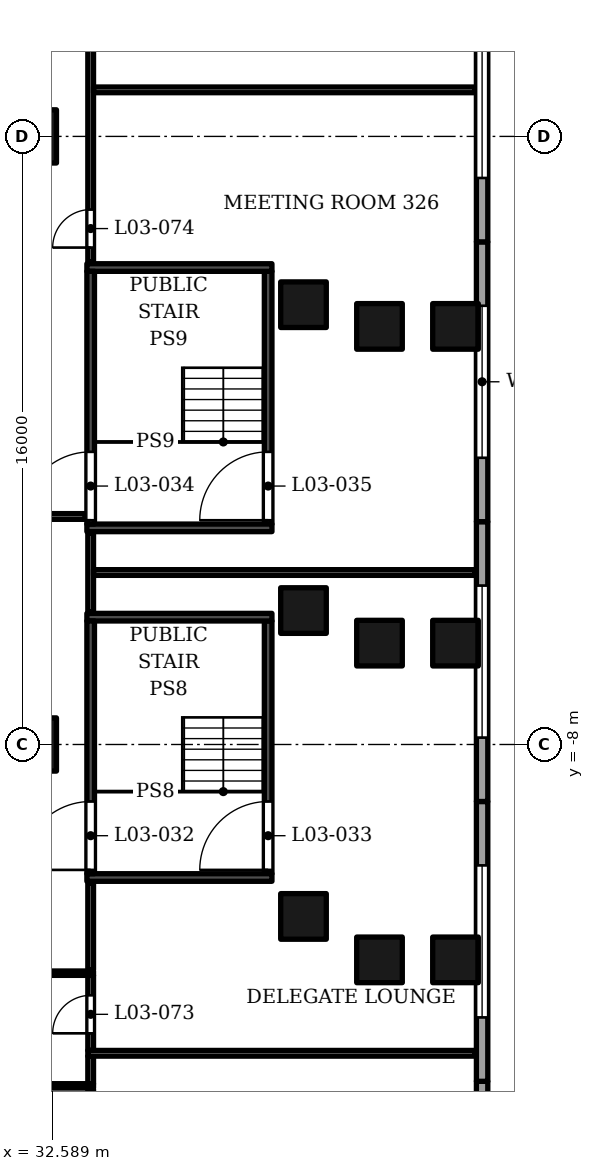
"""IFC4 building model, lengths in metres.
Left out: names, types, materials, properties, quantities, classifications, styles, units other than length and angle.
Written with IfcOpenShell. Run it as: python <this file> out.ifc"""

import sys

from ifc_helpers import new_model, si_unit, direction, frame, frame_2d, origin, origin_2d, place, context, subcontext, project, spatial, rectangle, extrude, element, fill, save


model = new_model("IFC4")
c1 = context("Model", 3, precision=1e-05, world=origin(), true_north=direction((0.0, 1.0)))
c2 = subcontext(c1, "Body", "Model", "MODEL_VIEW")
j1 = project(units=[si_unit("LENGTHUNIT", "METRE"), si_unit("PLANEANGLEUNIT", "RADIAN")], contexts=[c1])
p1 = place(None, origin())
s1 = spatial("IfcSite", under=j1, at=p1, CompositionType="ELEMENT")
p2 = place(p1, origin())
s2 = spatial("IfcBuilding", under=s1, at=p2, CompositionType="ELEMENT")
p3 = place(p2, frame((0.0, 0.0, 29.0)))
s3 = spatial("IfcBuildingStorey", under=s2, at=p3, CompositionType="ELEMENT", Elevation=29.0)
for number, where, z_axis, x_axis in (
    (1, (32.0, -8.0, 0.0), (0.0, 0.0, 1.0), (1.0, 0.0, 0.0)),
    (2, (32.0, 8.0, 0.0), (0.0, 0.0, 1.0), (1.0, 0.0, 0.0)),
):
    element("IfcColumn", number, at=place(p3, frame(where, z_axis=z_axis, x_axis=x_axis)), inside=s3, PredefinedType="COLUMN", context=c2, shape_type="SweptSolid", body=[
        extrude(rectangle(XDim=1.4, YDim=1.4, at=origin_2d()), origin(), (0.0, 0.0, 1.0), 5.5),
    ])
for number, where, z_axis, x_axis in (
    (3, (39.2, 3.572, 0.0), (0.0, 0.0, 1.0), (1.0, 0.0, 0.0)),
    (4, (39.2, -4.476, 0.0), (0.0, 0.0, 1.0), (1.0, 0.0, 0.0)),
    (5, (39.2, -12.524, 0.0), (0.0, 0.0, 1.0), (1.0, 0.0, 0.0)),
    (6, (41.2, 3.001, 0.0), (0.0, 0.0, 1.0), (1.0, 0.0, 0.0)),
    (7, (41.2, -5.333, 0.0), (0.0, 0.0, 1.0), (1.0, 0.0, 0.0)),
    (8, (41.2, -13.667, 0.0), (0.0, 0.0, 1.0), (1.0, 0.0, 0.0)),
    (9, (43.2, 3.001, 0.0), (0.0, 0.0, 1.0), (1.0, 0.0, 0.0)),
    (10, (43.2, -5.333, 0.0), (0.0, 0.0, 1.0), (1.0, 0.0, 0.0)),
    (11, (43.2, -13.667, 0.0), (0.0, 0.0, 1.0), (1.0, 0.0, 0.0)),
):
    element("IfcColumn", number, at=place(p3, frame(where, z_axis=z_axis, x_axis=x_axis)), inside=s3, PredefinedType="COLUMN", context=c2, shape_type="SweptSolid", body=[
        extrude(rectangle(XDim=1.2, YDim=1.2, at=origin_2d()), origin(), (0.0, 0.0, 1.0), 5.5),
    ])
p4 = place(p3, frame((43.9, -24.225, 0.0), z_axis=(0.0, 0.0, 1.0), x_axis=(0.0, 1.0, 0.0)))
e12 = element("IfcWall", 12, at=p4, inside=s3, PredefinedType="SOLIDWALL", context=c2, shape_type="SweptSolid", body=[
    extrude(rectangle(XDim=7.363, YDim=0.3, at=frame_2d((3.681, 0.0))), origin(), (0.0, 0.0, 1.0), 4.1),
])
p5 = place(p4, frame((1.681, 0.0, 1.0)))
e13 = element("IfcOpeningElement", 13, at=p5, cuts=e12, PredefinedType="OPENING", context=c2, shape_type="SweptSolid", body=[
    extrude(rectangle(XDim=4.0, YDim=1.8, at=frame_2d((2.0, 0.9))), frame((0.0, 0.16, 0.0), z_axis=(0.0, -1.0, 0.0), x_axis=(1.0, 0.0, 0.0)), (0.0, 0.0, 1.0), 0.32),
])
p6 = place(p3, frame((43.9, -16.863, 0.0), z_axis=(0.0, 0.0, 1.0), x_axis=(0.0, 1.0, 0.0)))
e14 = element("IfcWall", 14, at=p6, inside=s3, PredefinedType="SOLIDWALL", context=c2, shape_type="SweptSolid", body=[
    extrude(rectangle(XDim=7.363, YDim=0.3, at=frame_2d((3.681, 0.0))), origin(), (0.0, 0.0, 1.0), 4.1),
])
p7 = place(p6, frame((1.681, 0.0, 1.0)))
e15 = element("IfcOpeningElement", 15, at=p7, cuts=e14, PredefinedType="OPENING", context=c2, shape_type="SweptSolid", body=[
    extrude(rectangle(XDim=4.0, YDim=1.8, at=frame_2d((2.0, 0.9))), frame((0.0, 0.16, 0.0), z_axis=(0.0, -1.0, 0.0), x_axis=(1.0, 0.0, 0.0)), (0.0, 0.0, 1.0), 0.32),
])
p8 = place(p3, frame((43.9, -9.5, 0.0), z_axis=(0.0, 0.0, 1.0), x_axis=(0.0, 1.0, 0.0)))
e16 = element("IfcWall", 16, at=p8, inside=s3, PredefinedType="SOLIDWALL", context=c2, shape_type="SweptSolid", body=[
    extrude(rectangle(XDim=7.363, YDim=0.3, at=frame_2d((3.681, 0.0))), origin(), (0.0, 0.0, 1.0), 4.1),
])
p9 = place(p8, frame((1.681, 0.0, 1.0)))
e17 = element("IfcOpeningElement", 17, at=p9, cuts=e16, PredefinedType="OPENING", context=c2, shape_type="SweptSolid", body=[
    extrude(rectangle(XDim=4.0, YDim=1.8, at=frame_2d((2.0, 0.9))), frame((0.0, 0.16, 0.0), z_axis=(0.0, -1.0, 0.0), x_axis=(1.0, 0.0, 0.0)), (0.0, 0.0, 1.0), 0.32),
])
p10 = place(p3, frame((43.9, -2.137, 0.0), z_axis=(0.0, 0.0, 1.0), x_axis=(0.0, 1.0, 0.0)))
e18 = element("IfcWall", 18, at=p10, inside=s3, PredefinedType="SOLIDWALL", context=c2, shape_type="SweptSolid", body=[
    extrude(rectangle(XDim=7.363, YDim=0.3, at=frame_2d((3.681, 0.0))), origin(), (0.0, 0.0, 1.0), 4.1),
])
p11 = place(p10, frame((1.681, 0.0, 1.0)))
e19 = element("IfcOpeningElement", 19, at=p11, cuts=e18, PredefinedType="OPENING", context=c2, shape_type="SweptSolid", body=[
    extrude(rectangle(XDim=4.0, YDim=1.8, at=frame_2d((2.0, 0.9))), frame((0.0, 0.16, 0.0), z_axis=(0.0, -1.0, 0.0), x_axis=(1.0, 0.0, 0.0)), (0.0, 0.0, 1.0), 0.32),
])
p12 = place(p3, frame((43.9, 5.225, 0.0), z_axis=(0.0, 0.0, 1.0), x_axis=(0.0, 1.0, 0.0)))
e20 = element("IfcWall", 20, at=p12, inside=s3, PredefinedType="SOLIDWALL", context=c2, shape_type="SweptSolid", body=[
    extrude(rectangle(XDim=7.362, YDim=0.3, at=frame_2d((3.681, 0.0))), origin(), (0.0, 0.0, 1.0), 4.1),
])
p13 = place(p12, frame((1.681, 0.0, 1.0)))
e21 = element("IfcOpeningElement", 21, at=p13, cuts=e20, PredefinedType="OPENING", context=c2, shape_type="SweptSolid", body=[
    extrude(rectangle(XDim=4.0, YDim=1.8, at=frame_2d((2.0, 0.9))), frame((0.0, 0.16, 0.0), z_axis=(0.0, -1.0, 0.0), x_axis=(1.0, 0.0, 0.0)), (0.0, 0.0, 1.0), 0.32),
])
for number, where, z_axis, x_axis in (
    (22, (43.85, -24.093, 5.5), (0.0, 0.0, 1.0), (0.0, 1.0, 0.0)),
    (23, (43.85, -9.395, 5.5), (0.0, 0.0, 1.0), (0.0, 1.0, 0.0)),
    (24, (43.85, 5.302, 5.5), (0.0, 0.0, 1.0), (0.0, 1.0, 0.0)),
):
    element("IfcWall", number, at=place(p3, frame(where, z_axis=z_axis, x_axis=x_axis)), inside=s3, PredefinedType="PARAPET", context=c2, shape_type="SweptSolid", body=[
        extrude(rectangle(XDim=14.698, YDim=0.3, at=frame_2d((7.349, 0.0))), origin(), (0.0, 0.0, 1.0), 1.1),
    ])
for number, where, z_axis, x_axis in (
    (25, (33.5, -11.5, 0.0), (0.0, 0.0, 1.0), (1.0, 0.0, 0.0)),
    (26, (33.5, -4.65, 0.0), (0.0, 0.0, 1.0), (1.0, 0.0, 0.0)),
):
    element("IfcWall", number, at=place(p3, frame(where, z_axis=z_axis, x_axis=x_axis)), inside=s3, PredefinedType="SOLIDWALL", context=c2, shape_type="SweptSolid", body=[
        extrude(rectangle(XDim=4.87, YDim=0.2, at=frame_2d((2.435, 0.0))), origin(), (0.0, 0.0, 1.0), 5.05),
    ])
p14 = place(p3, frame((33.6, -11.4, 0.0), z_axis=(0.0, 0.0, 1.0), x_axis=(0.0, 1.0, 0.0)))
e27 = element("IfcWall", 27, at=p14, inside=s3, PredefinedType="SOLIDWALL", context=c2, shape_type="SweptSolid", body=[
    extrude(rectangle(XDim=6.65, YDim=0.2, at=frame_2d((3.325, 0.0))), origin(), (0.0, 0.0, 1.0), 5.05),
])
p15 = place(p14, frame((0.1, 0.0, 0.0)))
e28 = element("IfcOpeningElement", 28, at=p15, cuts=e27, PredefinedType="OPENING", context=c2, shape_type="SweptSolid", body=[
    extrude(rectangle(XDim=1.8, YDim=2.4, at=frame_2d((0.9, 1.2))), frame((0.0, 0.11, 0.0), z_axis=(0.0, -1.0, 0.0), x_axis=(1.0, 0.0, 0.0)), (0.0, 0.0, 1.0), 0.22),
])
p16 = place(p3, frame((38.27, -11.4, 0.0), z_axis=(0.0, 0.0, 1.0), x_axis=(0.0, 1.0, 0.0)))
e29 = element("IfcWall", 29, at=p16, inside=s3, PredefinedType="SOLIDWALL", context=c2, shape_type="SweptSolid", body=[
    extrude(rectangle(XDim=6.65, YDim=0.2, at=frame_2d((3.325, 0.0))), origin(), (0.0, 0.0, 1.0), 5.05),
])
p17 = place(p16, frame((0.1, 0.0, 0.0)))
e30 = element("IfcOpeningElement", 30, at=p17, cuts=e29, PredefinedType="OPENING", context=c2, shape_type="SweptSolid", body=[
    extrude(rectangle(XDim=1.8, YDim=2.4, at=frame_2d((0.9, 1.2))), frame((0.0, 0.11, 0.0), z_axis=(0.0, -1.0, 0.0), x_axis=(1.0, 0.0, 0.0)), (0.0, 0.0, 1.0), 0.22),
])
for number, where, z_axis, x_axis in (
    (31, (33.5, -2.3, 0.0), (0.0, 0.0, 1.0), (1.0, 0.0, 0.0)),
    (32, (33.5, 4.55, 0.0), (0.0, 0.0, 1.0), (1.0, 0.0, 0.0)),
):
    element("IfcWall", number, at=place(p3, frame(where, z_axis=z_axis, x_axis=x_axis)), inside=s3, PredefinedType="SOLIDWALL", context=c2, shape_type="SweptSolid", body=[
        extrude(rectangle(XDim=4.87, YDim=0.2, at=frame_2d((2.435, 0.0))), origin(), (0.0, 0.0, 1.0), 5.05),
    ])
p18 = place(p3, frame((33.6, -2.2, 0.0), z_axis=(0.0, 0.0, 1.0), x_axis=(0.0, 1.0, 0.0)))
e33 = element("IfcWall", 33, at=p18, inside=s3, PredefinedType="SOLIDWALL", context=c2, shape_type="SweptSolid", body=[
    extrude(rectangle(XDim=6.65, YDim=0.2, at=frame_2d((3.325, 0.0))), origin(), (0.0, 0.0, 1.0), 5.05),
])
p19 = place(p18, frame((0.1, 0.0, 0.0)))
e34 = element("IfcOpeningElement", 34, at=p19, cuts=e33, PredefinedType="OPENING", context=c2, shape_type="SweptSolid", body=[
    extrude(rectangle(XDim=1.8, YDim=2.4, at=frame_2d((0.9, 1.2))), frame((0.0, 0.11, 0.0), z_axis=(0.0, -1.0, 0.0), x_axis=(1.0, 0.0, 0.0)), (0.0, 0.0, 1.0), 0.22),
])
p20 = place(p3, frame((38.27, -2.2, 0.0), z_axis=(0.0, 0.0, 1.0), x_axis=(0.0, 1.0, 0.0)))
e35 = element("IfcWall", 35, at=p20, inside=s3, PredefinedType="SOLIDWALL", context=c2, shape_type="SweptSolid", body=[
    extrude(rectangle(XDim=6.65, YDim=0.2, at=frame_2d((3.325, 0.0))), origin(), (0.0, 0.0, 1.0), 5.05),
])
p21 = place(p20, frame((0.1, 0.0, 0.0)))
e36 = element("IfcOpeningElement", 36, at=p21, cuts=e35, PredefinedType="OPENING", context=c2, shape_type="SweptSolid", body=[
    extrude(rectangle(XDim=1.8, YDim=2.4, at=frame_2d((0.9, 1.2))), frame((0.0, 0.11, 0.0), z_axis=(0.0, -1.0, 0.0), x_axis=(1.0, 0.0, 0.0)), (0.0, 0.0, 1.0), 0.22),
])
p22 = place(p3, frame((33.6, -20.61, 0.0), z_axis=(0.0, 0.0, 1.0), x_axis=(0.0, 1.0, 0.0)))
e37 = element("IfcWall", 37, at=p22, inside=s3, PredefinedType="PARTITIONING", context=c2, shape_type="SweptSolid", body=[
    extrude(rectangle(XDim=3.535, YDim=0.15, at=frame_2d((1.768, 0.0))), origin(), (0.0, 0.0, 1.0), 5.05),
])
p23 = place(p3, frame((14.77, -16.982, 0.0), z_axis=(0.0, 0.0, 1.0), x_axis=(1.0, 0.0, 0.0)))
e38 = element("IfcWall", 38, at=p23, inside=s3, PredefinedType="PARTITIONING", context=c2, shape_type="SweptSolid", body=[
    extrude(rectangle(XDim=18.905, YDim=0.115, at=frame_2d((9.453, 0.0))), origin(), (0.0, 0.0, 1.0), 3.85),
])
p24 = place(p23, frame((13.48, 0.0, 0.0)))
e39 = element("IfcOpeningElement", 39, at=p24, cuts=e38, PredefinedType="OPENING", context=c2, shape_type="SweptSolid", body=[
    extrude(rectangle(XDim=1.0, YDim=2.1, at=frame_2d((0.5, 1.05))), frame((0.0, 0.067, 0.0), z_axis=(0.0, -1.0, 0.0), x_axis=(1.0, 0.0, 0.0)), (0.0, 0.0, 1.0), 0.135),
])
p25 = place(p3, frame((33.6, -16.925, 0.0), z_axis=(0.0, 0.0, 1.0), x_axis=(0.0, 1.0, 0.0)))
e40 = element("IfcWall", 40, at=p25, inside=s3, PredefinedType="PARTITIONING", context=c2, shape_type="SweptSolid", body=[
    extrude(rectangle(XDim=0.725, YDim=0.15, at=frame_2d((0.363, 0.0))), origin(), (0.0, 0.0, 1.0), 5.05),
])
p26 = place(p3, frame((33.525, -16.125, 0.0), z_axis=(0.0, 0.0, 1.0), x_axis=(1.0, 0.0, 0.0)))
e41 = element("IfcWall", 41, at=p26, inside=s3, PredefinedType="PARTITIONING", context=c2, shape_type="SweptSolid", body=[
    extrude(rectangle(XDim=10.195, YDim=0.15, at=frame_2d((5.098, 0.0))), origin(), (0.0, 0.0, 1.0), 4.15),
])
p27 = place(p3, frame((33.6, -16.05, 0.0), z_axis=(0.0, 0.0, 1.0), x_axis=(0.0, 1.0, 0.0)))
e42 = element("IfcWall", 42, at=p27, inside=s3, PredefinedType="PARTITIONING", context=c2, shape_type="SweptSolid", body=[
    extrude(rectangle(XDim=1.975, YDim=0.15, at=frame_2d((0.988, 0.0))), origin(), (0.0, 0.0, 1.0), 5.05),
])
p28 = place(p27, frame((0.45, 0.0, 0.0)))
e43 = element("IfcOpeningElement", 43, at=p28, cuts=e42, PredefinedType="OPENING", context=c2, shape_type="SweptSolid", body=[
    extrude(rectangle(XDim=1.0, YDim=2.1, at=frame_2d((0.5, 1.05))), frame((0.0, 0.085, 0.0), z_axis=(0.0, -1.0, 0.0), x_axis=(1.0, 0.0, 0.0)), (0.0, 0.0, 1.0), 0.17),
])
p29 = place(p3, frame((14.77, -14.018, 0.0), z_axis=(0.0, 0.0, 1.0), x_axis=(1.0, 0.0, 0.0)))
e44 = element("IfcWall", 44, at=p29, inside=s3, PredefinedType="PARTITIONING", context=c2, shape_type="SweptSolid", body=[
    extrude(rectangle(XDim=18.905, YDim=0.115, at=frame_2d((9.453, 0.0))), origin(), (0.0, 0.0, 1.0), 3.85),
])
p30 = place(p29, frame((13.63, 0.0, 0.0)))
e45 = element("IfcOpeningElement", 45, at=p30, cuts=e44, PredefinedType="OPENING", context=c2, shape_type="SweptSolid", body=[
    extrude(rectangle(XDim=1.0, YDim=2.1, at=frame_2d((0.5, 1.05))), frame((0.0, 0.067, 0.0), z_axis=(0.0, -1.0, 0.0), x_axis=(1.0, 0.0, 0.0)), (0.0, 0.0, 1.0), 0.135),
])
p31 = place(p3, frame((33.6, -13.925, 0.0), z_axis=(0.0, 0.0, 1.0), x_axis=(0.0, 1.0, 0.0)))
e46 = element("IfcWall", 46, at=p31, inside=s3, PredefinedType="PARTITIONING", context=c2, shape_type="SweptSolid", body=[
    extrude(rectangle(XDim=2.285, YDim=0.15, at=frame_2d((1.143, 0.0))), origin(), (0.0, 0.0, 1.0), 5.05),
])
p32 = place(p3, frame((33.6, -4.51, 0.0), z_axis=(0.0, 0.0, 1.0), x_axis=(0.0, 1.0, 0.0)))
e47 = element("IfcWall", 47, at=p32, inside=s3, PredefinedType="PARTITIONING", context=c2, shape_type="SweptSolid", body=[
    extrude(rectangle(XDim=2.07, YDim=0.15, at=frame_2d((1.035, 0.0))), origin(), (0.0, 0.0, 1.0), 5.05),
])
p33 = place(p3, frame((33.675, -3.475, 0.0), z_axis=(0.0, 0.0, 1.0), x_axis=(1.0, 0.0, 0.0)))
e48 = element("IfcWall", 48, at=p33, inside=s3, PredefinedType="PARTITIONING", context=c2, shape_type="SweptSolid", body=[
    extrude(rectangle(XDim=10.045, YDim=0.15, at=frame_2d((5.022, 0.0))), origin(), (0.0, 0.0, 1.0), 4.15),
])
p34 = place(p3, frame((-33.46, -2.0, 0.0), z_axis=(0.0, 0.0, 1.0), x_axis=(1.0, 0.0, 0.0)))
e49 = element("IfcWall", 49, at=p34, inside=s3, PredefinedType="PARTITIONING", context=c2, shape_type="SweptSolid", body=[
    extrude(rectangle(XDim=66.92, YDim=0.15, at=frame_2d((33.46, 0.0))), origin(), (0.0, 0.0, 1.0), 3.85),
])
p35 = place(p34, frame((19.91, 0.0, 0.0)))
e50 = element("IfcOpeningElement", 50, at=p35, cuts=e49, PredefinedType="OPENING", context=c2, shape_type="SweptSolid", body=[
    extrude(rectangle(XDim=1.2, YDim=2.1, at=frame_2d((0.6, 1.05))), frame((0.0, 0.085, 0.0), z_axis=(0.0, -1.0, 0.0), x_axis=(1.0, 0.0, 0.0)), (0.0, 0.0, 1.0), 0.17),
])
p36 = place(p34, frame((45.91, 0.0, 0.0)))
e51 = element("IfcOpeningElement", 51, at=p36, cuts=e49, PredefinedType="OPENING", context=c2, shape_type="SweptSolid", body=[
    extrude(rectangle(XDim=1.2, YDim=2.1, at=frame_2d((0.6, 1.05))), frame((0.0, 0.085, 0.0), z_axis=(0.0, -1.0, 0.0), x_axis=(1.0, 0.0, 0.0)), (0.0, 0.0, 1.0), 0.17),
])
p37 = place(p34, frame((30.11, 0.0, 0.0)))
e52 = element("IfcOpeningElement", 52, at=p37, cuts=e49, PredefinedType="OPENING", context=c2, shape_type="SweptSolid", body=[
    extrude(rectangle(XDim=1.0, YDim=2.1, at=frame_2d((0.5, 1.05))), frame((0.0, 0.085, 0.0), z_axis=(0.0, -1.0, 0.0), x_axis=(1.0, 0.0, 0.0)), (0.0, 0.0, 1.0), 0.17),
])
p38 = place(p34, frame((35.86, 0.0, 0.0)))
e53 = element("IfcOpeningElement", 53, at=p38, cuts=e49, PredefinedType="OPENING", context=c2, shape_type="SweptSolid", body=[
    extrude(rectangle(XDim=1.0, YDim=2.1, at=frame_2d((0.5, 1.05))), frame((0.0, 0.085, 0.0), z_axis=(0.0, -1.0, 0.0), x_axis=(1.0, 0.0, 0.0)), (0.0, 0.0, 1.0), 0.17),
])
p39 = place(p3, frame((33.6, 4.69, 0.0), z_axis=(0.0, 0.0, 1.0), x_axis=(0.0, 1.0, 0.0)))
e54 = element("IfcWall", 54, at=p39, inside=s3, PredefinedType="PARTITIONING", context=c2, shape_type="SweptSolid", body=[
    extrude(rectangle(XDim=9.07, YDim=0.15, at=frame_2d((4.535, 0.0))), origin(), (0.0, 0.0, 1.0), 3.85),
])
p40 = place(p39, frame((0.385, 0.0, 0.0)))
e55 = element("IfcOpeningElement", 55, at=p40, cuts=e54, PredefinedType="OPENING", context=c2, shape_type="SweptSolid", body=[
    extrude(rectangle(XDim=1.0, YDim=2.1, at=frame_2d((0.5, 1.05))), frame((0.0, 0.085, 0.0), z_axis=(0.0, -1.0, 0.0), x_axis=(1.0, 0.0, 0.0)), (0.0, 0.0, 1.0), 0.17),
])
p41 = place(p39, frame((5.859, 0.0, 0.0)))
e56 = element("IfcOpeningElement", 56, at=p41, cuts=e54, PredefinedType="OPENING", context=c2, shape_type="SweptSolid", body=[
    extrude(rectangle(XDim=1.0, YDim=2.1, at=frame_2d((0.5, 1.05))), frame((0.0, 0.085, 0.0), z_axis=(0.0, -1.0, 0.0), x_axis=(1.0, 0.0, 0.0)), (0.0, 0.0, 1.0), 0.17),
])
p42 = place(p3, frame((33.675, 9.225, 0.0), z_axis=(0.0, 0.0, 1.0), x_axis=(1.0, 0.0, 0.0)))
e57 = element("IfcWall", 57, at=p42, inside=s3, PredefinedType="PARTITIONING", context=c2, shape_type="SweptSolid", body=[
    extrude(rectangle(XDim=10.045, YDim=0.15, at=frame_2d((5.022, 0.0))), origin(), (0.0, 0.0, 1.0), 4.15),
])
p43 = place(p7, origin())
e58 = element("IfcWindow", 58, at=p43, inside=s3, PartitioningType="SINGLE_PANEL", PredefinedType="WINDOW", context=c2, shape_type="SweptSolid", body=[
    extrude(rectangle(XDim=4.0, YDim=1.8, at=frame_2d((2.0, 0.9))), frame((0.0, 0.03, 0.0), z_axis=(0.0, -1.0, 0.0), x_axis=(1.0, 0.0, 0.0)), (0.0, 0.0, 1.0), 0.06),
])
fill(e15, e58)
p44 = place(p9, origin())
e59 = element("IfcWindow", 59, at=p44, inside=s3, PartitioningType="SINGLE_PANEL", PredefinedType="WINDOW", context=c2, shape_type="SweptSolid", body=[
    extrude(rectangle(XDim=4.0, YDim=1.8, at=frame_2d((2.0, 0.9))), frame((0.0, 0.03, 0.0), z_axis=(0.0, -1.0, 0.0), x_axis=(1.0, 0.0, 0.0)), (0.0, 0.0, 1.0), 0.06),
])
fill(e17, e59)
p45 = place(p11, origin())
e60 = element("IfcWindow", 60, at=p45, inside=s3, PartitioningType="SINGLE_PANEL", PredefinedType="WINDOW", context=c2, shape_type="SweptSolid", body=[
    extrude(rectangle(XDim=4.0, YDim=1.8, at=frame_2d((2.0, 0.9))), frame((0.0, 0.03, 0.0), z_axis=(0.0, -1.0, 0.0), x_axis=(1.0, 0.0, 0.0)), (0.0, 0.0, 1.0), 0.06),
])
fill(e19, e60)
p46 = place(p13, origin())
e61 = element("IfcWindow", 61, at=p46, inside=s3, PartitioningType="SINGLE_PANEL", PredefinedType="WINDOW", context=c2, shape_type="SweptSolid", body=[
    extrude(rectangle(XDim=4.0, YDim=1.8, at=frame_2d((2.0, 0.9))), frame((0.0, 0.03, 0.0), z_axis=(0.0, -1.0, 0.0), x_axis=(1.0, 0.0, 0.0)), (0.0, 0.0, 1.0), 0.06),
])
fill(e21, e61)
p47 = place(p15, origin())
e62 = element("IfcDoor", 62, at=p47, inside=s3, OperationType="DOUBLE_DOOR_SINGLE_SWING", PredefinedType="DOOR", context=c2, shape_type="SweptSolid", body=[
    extrude(rectangle(XDim=1.8, YDim=2.4, at=frame_2d((0.9, 1.2))), frame((0.0, 0.025, 0.0), z_axis=(0.0, -1.0, 0.0), x_axis=(1.0, 0.0, 0.0)), (0.0, 0.0, 1.0), 0.05),
])
fill(e28, e62)
p48 = place(p17, origin())
e63 = element("IfcDoor", 63, at=p48, inside=s3, OperationType="DOUBLE_DOOR_SINGLE_SWING", PredefinedType="DOOR", context=c2, shape_type="SweptSolid", body=[
    extrude(rectangle(XDim=1.8, YDim=2.4, at=frame_2d((0.9, 1.2))), frame((0.0, 0.025, 0.0), z_axis=(0.0, -1.0, 0.0), x_axis=(1.0, 0.0, 0.0)), (0.0, 0.0, 1.0), 0.05),
])
fill(e30, e63)
p49 = place(p19, origin())
e64 = element("IfcDoor", 64, at=p49, inside=s3, OperationType="DOUBLE_DOOR_SINGLE_SWING", PredefinedType="DOOR", context=c2, shape_type="SweptSolid", body=[
    extrude(rectangle(XDim=1.8, YDim=2.4, at=frame_2d((0.9, 1.2))), frame((0.0, 0.025, 0.0), z_axis=(0.0, -1.0, 0.0), x_axis=(1.0, 0.0, 0.0)), (0.0, 0.0, 1.0), 0.05),
])
fill(e34, e64)
p50 = place(p21, origin())
e65 = element("IfcDoor", 65, at=p50, inside=s3, OperationType="DOUBLE_DOOR_SINGLE_SWING", PredefinedType="DOOR", context=c2, shape_type="SweptSolid", body=[
    extrude(rectangle(XDim=1.8, YDim=2.4, at=frame_2d((0.9, 1.2))), frame((0.0, 0.025, 0.0), z_axis=(0.0, -1.0, 0.0), x_axis=(1.0, 0.0, 0.0)), (0.0, 0.0, 1.0), 0.05),
])
fill(e36, e65)
p51 = place(p28, origin())
e66 = element("IfcDoor", 66, at=p51, inside=s3, OperationType="SINGLE_SWING_LEFT", PredefinedType="DOOR", context=c2, shape_type="SweptSolid", body=[
    extrude(rectangle(XDim=1.0, YDim=2.1, at=frame_2d((0.5, 1.05))), frame((0.0, 0.025, 0.0), z_axis=(0.0, -1.0, 0.0), x_axis=(1.0, 0.0, 0.0)), (0.0, 0.0, 1.0), 0.05),
])
fill(e43, e66)
p52 = place(p40, origin())
e67 = element("IfcDoor", 67, at=p52, inside=s3, OperationType="SINGLE_SWING_LEFT", PredefinedType="DOOR", context=c2, shape_type="SweptSolid", body=[
    extrude(rectangle(XDim=1.0, YDim=2.1, at=frame_2d((0.5, 1.05))), frame((0.0, 0.025, 0.0), z_axis=(0.0, -1.0, 0.0), x_axis=(1.0, 0.0, 0.0)), (0.0, 0.0, 1.0), 0.05),
])
fill(e55, e67)
save(model, sys.argv[1])
